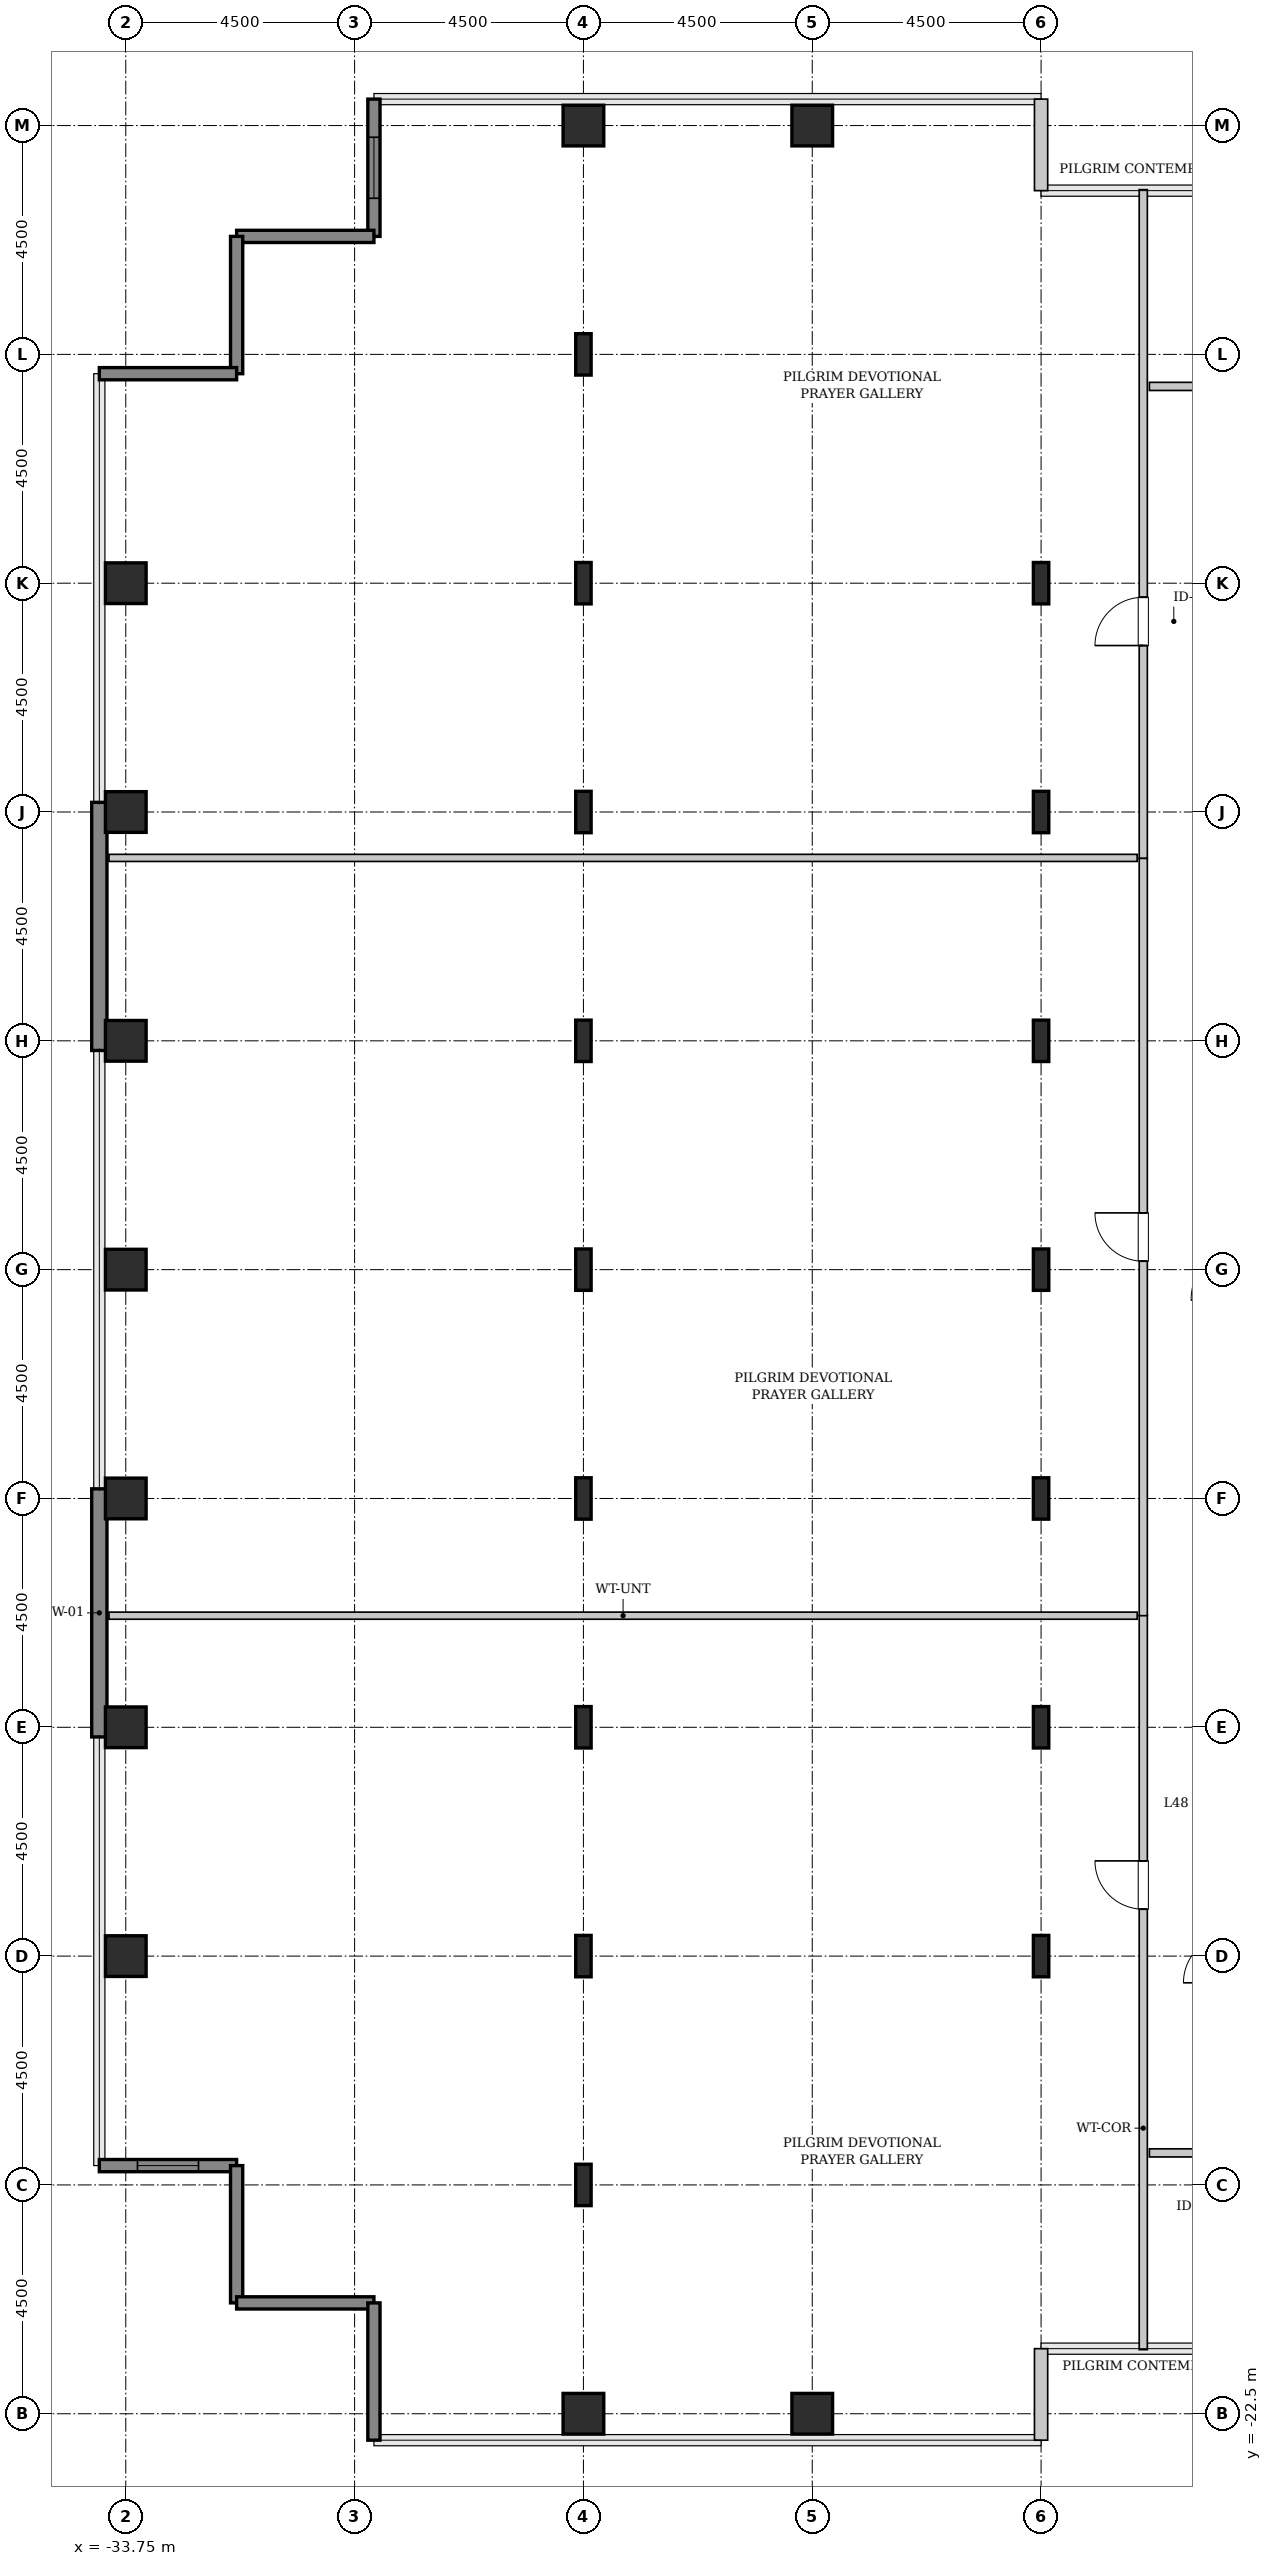
"""IFC4 building model, lengths in metres.
Left out: names, types, materials, properties, quantities, classifications, styles, units other than length and angle.
Written with IfcOpenShell. Run it as: python <this file> out.ifc"""

import sys

from ifc_helpers import new_model, si_unit, direction, frame, frame_2d, origin, origin_2d, place, context, subcontext, project, spatial, rectangle, hollow_rectangle, i_section, extrude, source, transform, mapped, element, fill, save


model = new_model("IFC4")
c1 = context("Model", 3, precision=1e-05, world=origin(), true_north=direction((0.0, 1.0)))
c2 = subcontext(c1, "Body", "Model", "MODEL_VIEW")
j1 = project(units=[si_unit("LENGTHUNIT", "METRE"), si_unit("PLANEANGLEUNIT", "RADIAN")], contexts=[c1])
p1 = place(None, origin())
s1 = spatial("IfcSite", under=j1, at=p1, CompositionType="ELEMENT")
p2 = place(p1, origin())
s2 = spatial("IfcBuilding", under=s1, at=p2, CompositionType="ELEMENT")
p3 = place(p2, frame((0.0, 0.0, 194.4)))
s3 = spatial("IfcBuildingStorey", under=s2, at=p3, CompositionType="ELEMENT", Elevation=194.4)
m1 = source(origin(), c2, "Body", "SweptSolid", [
    extrude(hollow_rectangle(XDim=0.8, YDim=0.8, WallThickness=0.04, InnerFilletRadius=0.04, OuterFilletRadius=0.08, at=origin_2d()), origin(), (0.0, 0.0, 1.0), 3.8),
])
for number, where, z_axis, x_axis in (
    (1, (-33.75, -13.5, 0.0), (0.0, 0.0, 1.0), (1.0, 0.0, 0.0)),
    (2, (-33.75, -9.0, 0.0), (0.0, 0.0, 1.0), (1.0, 0.0, 0.0)),
    (3, (-33.75, -4.5, 0.0), (0.0, 0.0, 1.0), (1.0, 0.0, 0.0)),
    (4, (-33.75, 0.0, 0.0), (0.0, 0.0, 1.0), (1.0, 0.0, 0.0)),
    (5, (-33.75, 4.5, 0.0), (0.0, 0.0, 1.0), (1.0, 0.0, 0.0)),
    (6, (-33.75, 9.0, 0.0), (0.0, 0.0, 1.0), (1.0, 0.0, 0.0)),
    (7, (-33.75, 13.5, 0.0), (0.0, 0.0, 1.0), (1.0, 0.0, 0.0)),
    (8, (-24.75, -22.5, 0.0), (0.0, 0.0, 1.0), (1.0, 0.0, 0.0)),
):
    element("IfcColumn", number, at=place(p3, frame(where, z_axis=z_axis, x_axis=x_axis)), inside=s3, PredefinedType="COLUMN", context=c2, shape_type="MappedRepresentation", body=[
        mapped(m1, transform((0.0, 0.0, 0.0), x_axis=(1.0, 0.0, 0.0), y_axis=(0.0, 1.0, 0.0), z_axis=(0.0, 0.0, 1.0), scale=1.0)),
    ])
m2 = source(origin(), c2, "Body", "SweptSolid", [
    extrude(i_section(OverallWidth=0.303, OverallDepth=0.814, WebThickness=0.021, FlangeThickness=0.04, FilletRadius=0.03, at=origin_2d()), origin(), (0.0, 0.0, 1.0), 3.8),
])
for number, where, z_axis, x_axis in (
    (9, (-24.75, -18.0, 0.0), (0.0, 0.0, 1.0), (1.0, 0.0, 0.0)),
    (10, (-24.75, -13.5, 0.0), (0.0, 0.0, 1.0), (1.0, 0.0, 0.0)),
    (11, (-24.75, -9.0, 0.0), (0.0, 0.0, 1.0), (1.0, 0.0, 0.0)),
    (12, (-24.75, -4.5, 0.0), (0.0, 0.0, 1.0), (1.0, 0.0, 0.0)),
    (13, (-24.75, 0.0, 0.0), (0.0, 0.0, 1.0), (1.0, 0.0, 0.0)),
    (14, (-24.75, 4.5, 0.0), (0.0, 0.0, 1.0), (1.0, 0.0, 0.0)),
    (15, (-24.75, 9.0, 0.0), (0.0, 0.0, 1.0), (1.0, 0.0, 0.0)),
    (16, (-24.75, 13.5, 0.0), (0.0, 0.0, 1.0), (1.0, 0.0, 0.0)),
    (17, (-24.75, 18.0, 0.0), (0.0, 0.0, 1.0), (1.0, 0.0, 0.0)),
):
    element("IfcColumn", number, at=place(p3, frame(where, z_axis=z_axis, x_axis=x_axis)), inside=s3, PredefinedType="COLUMN", context=c2, shape_type="MappedRepresentation", body=[
        mapped(m2, transform((0.0, 0.0, 0.0), x_axis=(1.0, 0.0, 0.0), y_axis=(0.0, 1.0, 0.0), z_axis=(0.0, 0.0, 1.0), scale=1.0)),
    ])
for number, where, z_axis, x_axis in (
    (18, (-24.75, 22.5, 0.0), (0.0, 0.0, 1.0), (1.0, 0.0, 0.0)),
    (19, (-20.25, -22.5, 0.0), (0.0, 0.0, 1.0), (1.0, 0.0, 0.0)),
    (20, (-20.25, 22.5, 0.0), (0.0, 0.0, 1.0), (1.0, 0.0, 0.0)),
):
    element("IfcColumn", number, at=place(p3, frame(where, z_axis=z_axis, x_axis=x_axis)), inside=s3, PredefinedType="COLUMN", context=c2, shape_type="MappedRepresentation", body=[
        mapped(m1, transform((0.0, 0.0, 0.0), x_axis=(1.0, 0.0, 0.0), y_axis=(0.0, 1.0, 0.0), z_axis=(0.0, 0.0, 1.0), scale=1.0)),
    ])
for number, where, z_axis, x_axis in (
    (21, (-15.75, -13.5, 0.0), (0.0, 0.0, 1.0), (1.0, 0.0, 0.0)),
    (22, (-15.75, -9.0, 0.0), (0.0, 0.0, 1.0), (1.0, 0.0, 0.0)),
    (23, (-15.75, -4.5, 0.0), (0.0, 0.0, 1.0), (1.0, 0.0, 0.0)),
    (24, (-15.75, 0.0, 0.0), (0.0, 0.0, 1.0), (1.0, 0.0, 0.0)),
    (25, (-15.75, 4.5, 0.0), (0.0, 0.0, 1.0), (1.0, 0.0, 0.0)),
    (26, (-15.75, 9.0, 0.0), (0.0, 0.0, 1.0), (1.0, 0.0, 0.0)),
    (27, (-15.75, 13.5, 0.0), (0.0, 0.0, 1.0), (1.0, 0.0, 0.0)),
):
    element("IfcColumn", number, at=place(p3, frame(where, z_axis=z_axis, x_axis=x_axis)), inside=s3, PredefinedType="COLUMN", context=c2, shape_type="MappedRepresentation", body=[
        mapped(m2, transform((0.0, 0.0, 0.0), x_axis=(1.0, 0.0, 0.0), y_axis=(0.0, 1.0, 0.0), z_axis=(0.0, 0.0, 1.0), scale=1.0)),
    ])
m3 = source(origin(), c2, "Body", "SweptSolid", [
    extrude(rectangle(XDim=4.88, YDim=0.3, at=frame_2d((2.44, 0.0))), origin(), (0.0, 0.0, 1.0), 3.55),
])
for number, where, z_axis, x_axis in (
    (28, (-34.27, -9.19, 0.0), (0.0, 0.0, 1.0), (0.0, 1.0, 0.0)),
    (29, (-34.27, 4.31, 0.0), (0.0, 0.0, 1.0), (0.0, 1.0, 0.0)),
):
    element("IfcWall", number, at=place(p3, frame(where, z_axis=z_axis, x_axis=x_axis)), inside=s3, PredefinedType="SHEAR", context=c2, shape_type="MappedRepresentation", body=[
        mapped(m3, transform((0.0, 0.0, 0.0), x_axis=(1.0, 0.0, 0.0), y_axis=(0.0, 1.0, 0.0), z_axis=(0.0, 0.0, 1.0), scale=1.0)),
    ])
m4 = source(origin(), c2, "Body", "SweptSolid", [
    extrude(rectangle(XDim=1.8, YDim=0.26, at=frame_2d((0.9, 0.0))), origin(), (0.0, 0.0, 1.0), 3.55),
])
p4 = place(p3, frame((-15.75, 21.22, 0.0), z_axis=(0.0, 0.0, 1.0), x_axis=(0.0, 1.0, 0.0)))
e30 = element("IfcWall", 30, at=p4, inside=s3, PredefinedType="SOLIDWALL", context=c2, shape_type="MappedRepresentation", body=[
    mapped(m4, transform((0.0, 0.0, 0.0), x_axis=(1.0, 0.0, 0.0), y_axis=(0.0, 1.0, 0.0), z_axis=(0.0, 0.0, 1.0), scale=1.0)),
])
m5 = source(origin(), c2, "Body", "SweptSolid", [
    extrude(rectangle(XDim=2.7, YDim=0.24, at=frame_2d((1.35, 0.0))), origin(), (0.0, 0.0, 1.0), 3.55),
])
p5 = place(p3, frame((-28.87, 23.02, 0.0), z_axis=(0.0, 0.0, 1.0), x_axis=(0.0, -1.0, 0.0)))
e31 = element("IfcWall", 31, at=p5, inside=s3, PredefinedType="SHEAR", context=c2, shape_type="MappedRepresentation", body=[
    mapped(m5, transform((0.0, 0.0, 0.0), x_axis=(1.0, 0.0, 0.0), y_axis=(0.0, 1.0, 0.0), z_axis=(0.0, 0.0, 1.0), scale=1.0)),
])
p6 = place(p5, frame((0.75, 0.0, 0.85)))
e32 = element("IfcOpeningElement", 32, at=p6, cuts=e31, PredefinedType="OPENING", context=c2, shape_type="SweptSolid", body=[
    extrude(rectangle(XDim=1.2, YDim=1.8, at=frame_2d((0.6, 0.9))), frame((0.0, 0.13, 0.0), z_axis=(0.0, -1.0, 0.0), x_axis=(1.0, 0.0, 0.0)), (0.0, 0.0, 1.0), 0.26),
])
for number, where, z_axis, x_axis in (
    (33, (-28.87, 20.32, 0.0), (0.0, 0.0, 1.0), (-1.0, 0.0, 0.0)),
    (34, (-31.57, 20.32, 0.0), (0.0, 0.0, 1.0), (0.0, -1.0, 0.0)),
    (35, (-31.57, 17.62, 0.0), (0.0, 0.0, 1.0), (-1.0, 0.0, 0.0)),
):
    element("IfcWall", number, at=place(p3, frame(where, z_axis=z_axis, x_axis=x_axis)), inside=s3, PredefinedType="SHEAR", context=c2, shape_type="MappedRepresentation", body=[
        mapped(m5, transform((0.0, 0.0, 0.0), x_axis=(1.0, 0.0, 0.0), y_axis=(0.0, 1.0, 0.0), z_axis=(0.0, 0.0, 1.0), scale=1.0)),
    ])
p7 = place(p3, frame((-34.27, -17.62, 0.0), z_axis=(0.0, 0.0, 1.0), x_axis=(1.0, 0.0, 0.0)))
e36 = element("IfcWall", 36, at=p7, inside=s3, PredefinedType="SHEAR", context=c2, shape_type="MappedRepresentation", body=[
    mapped(m5, transform((0.0, 0.0, 0.0), x_axis=(1.0, 0.0, 0.0), y_axis=(0.0, 1.0, 0.0), z_axis=(0.0, 0.0, 1.0), scale=1.0)),
])
p8 = place(p7, frame((0.75, 0.0, 0.85)))
e37 = element("IfcOpeningElement", 37, at=p8, cuts=e36, PredefinedType="OPENING", context=c2, shape_type="SweptSolid", body=[
    extrude(rectangle(XDim=1.2, YDim=1.8, at=frame_2d((0.6, 0.9))), frame((0.0, 0.13, 0.0), z_axis=(0.0, -1.0, 0.0), x_axis=(1.0, 0.0, 0.0)), (0.0, 0.0, 1.0), 0.26),
])
for number, where, z_axis, x_axis in (
    (38, (-31.57, -17.62, 0.0), (0.0, 0.0, 1.0), (0.0, -1.0, 0.0)),
    (39, (-31.57, -20.32, 0.0), (0.0, 0.0, 1.0), (1.0, 0.0, 0.0)),
    (40, (-28.87, -20.32, 0.0), (0.0, 0.0, 1.0), (0.0, -1.0, 0.0)),
):
    element("IfcWall", number, at=place(p3, frame(where, z_axis=z_axis, x_axis=x_axis)), inside=s3, PredefinedType="SHEAR", context=c2, shape_type="MappedRepresentation", body=[
        mapped(m5, transform((0.0, 0.0, 0.0), x_axis=(1.0, 0.0, 0.0), y_axis=(0.0, 1.0, 0.0), z_axis=(0.0, 0.0, 1.0), scale=1.0)),
    ])
p9 = place(p3, frame((-15.75, -23.02, 0.0), z_axis=(0.0, 0.0, 1.0), x_axis=(0.0, 1.0, 0.0)))
e41 = element("IfcWall", 41, at=p9, inside=s3, PredefinedType="SOLIDWALL", context=c2, shape_type="MappedRepresentation", body=[
    mapped(m4, transform((0.0, 0.0, 0.0), x_axis=(1.0, 0.0, 0.0), y_axis=(0.0, 1.0, 0.0), z_axis=(0.0, 0.0, 1.0), scale=1.0)),
])
m6 = source(origin(), c2, "Body", "SweptSolid", [
    extrude(rectangle(XDim=14.445, YDim=0.16, at=frame_2d((7.223, 0.0))), origin(), (0.0, 0.0, 1.0), 3.535),
])
p10 = place(p3, frame((-13.74, -21.24, 0.0), z_axis=(0.0, 0.0, 1.0), x_axis=(0.0, 1.0, 0.0)))
e42 = element("IfcWall", 42, at=p10, inside=s3, PredefinedType="PARTITIONING", context=c2, shape_type="MappedRepresentation", body=[
    mapped(m6, transform((0.0, 0.0, 0.0), x_axis=(1.0, 0.0, 0.0), y_axis=(0.0, 1.0, 0.0), z_axis=(0.0, 0.0, 1.0), scale=1.0)),
])
p11 = place(p10, frame((8.663, 0.0, 0.0)))
e43 = element("IfcOpeningElement", 43, at=p11, cuts=e42, PredefinedType="OPENING", context=c2, shape_type="SweptSolid", body=[
    extrude(rectangle(XDim=0.95, YDim=2.1, at=frame_2d((0.475, 1.05))), frame((0.0, 0.09, 0.0), z_axis=(0.0, -1.0, 0.0), x_axis=(1.0, 0.0, 0.0)), (0.0, 0.0, 1.0), 0.18),
])
m7 = source(origin(), c2, "Body", "SweptSolid", [
    extrude(rectangle(XDim=20.22, YDim=0.14, at=frame_2d((10.11, 0.0))), origin(), (0.0, 0.0, 1.0), 3.535),
])
p12 = place(p3, frame((-34.08, -6.805, 0.0), z_axis=(0.0, 0.0, 1.0), x_axis=(1.0, 0.0, 0.0)))
e44 = element("IfcWall", 44, at=p12, inside=s3, PredefinedType="PARTITIONING", context=c2, shape_type="MappedRepresentation", body=[
    mapped(m7, transform((0.0, 0.0, 0.0), x_axis=(1.0, 0.0, 0.0), y_axis=(0.0, 1.0, 0.0), z_axis=(0.0, 0.0, 1.0), scale=1.0)),
])
m8 = source(origin(), c2, "Body", "SweptSolid", [
    extrude(rectangle(XDim=13.153, YDim=0.16, at=frame_2d((6.576, 0.0))), origin(), (0.0, 0.0, 1.0), 3.535),
])
p13 = place(p3, frame((-13.74, 8.087, 0.0), z_axis=(0.0, 0.0, 1.0), x_axis=(0.0, 1.0, 0.0)))
e45 = element("IfcWall", 45, at=p13, inside=s3, PredefinedType="PARTITIONING", context=c2, shape_type="MappedRepresentation", body=[
    mapped(m8, transform((0.0, 0.0, 0.0), x_axis=(1.0, 0.0, 0.0), y_axis=(0.0, 1.0, 0.0), z_axis=(0.0, 0.0, 1.0), scale=1.0)),
])
p14 = place(p13, frame((4.186, 0.0, 0.0)))
e46 = element("IfcOpeningElement", 46, at=p14, cuts=e45, PredefinedType="OPENING", context=c2, shape_type="SweptSolid", body=[
    extrude(rectangle(XDim=0.95, YDim=2.1, at=frame_2d((0.475, 1.05))), frame((0.0, 0.09, 0.0), z_axis=(0.0, -1.0, 0.0), x_axis=(1.0, 0.0, 0.0)), (0.0, 0.0, 1.0), 0.18),
])
p15 = place(p3, frame((-34.08, 8.097, 0.0), z_axis=(0.0, 0.0, 1.0), x_axis=(1.0, 0.0, 0.0)))
e47 = element("IfcWall", 47, at=p15, inside=s3, PredefinedType="PARTITIONING", context=c2, shape_type="MappedRepresentation", body=[
    mapped(m7, transform((0.0, 0.0, 0.0), x_axis=(1.0, 0.0, 0.0), y_axis=(0.0, 1.0, 0.0), z_axis=(0.0, 0.0, 1.0), scale=1.0)),
])
m9 = source(origin(), c2, "Body", "SweptSolid", [
    extrude(rectangle(XDim=14.892, YDim=0.16, at=frame_2d((7.446, 0.0))), origin(), (0.0, 0.0, 1.0), 3.535),
])
p16 = place(p3, frame((-13.74, -6.805, 0.0), z_axis=(0.0, 0.0, 1.0), x_axis=(0.0, 1.0, 0.0)))
e48 = element("IfcWall", 48, at=p16, inside=s3, PredefinedType="PARTITIONING", context=c2, shape_type="MappedRepresentation", body=[
    mapped(m9, transform((0.0, 0.0, 0.0), x_axis=(1.0, 0.0, 0.0), y_axis=(0.0, 1.0, 0.0), z_axis=(0.0, 0.0, 1.0), scale=1.0)),
])
p17 = place(p16, frame((6.971, 0.0, 0.0)))
e49 = element("IfcOpeningElement", 49, at=p17, cuts=e48, PredefinedType="OPENING", context=c2, shape_type="SweptSolid", body=[
    extrude(rectangle(XDim=0.95, YDim=2.1, at=frame_2d((0.475, 1.05))), frame((0.0, 0.09, 0.0), z_axis=(0.0, -1.0, 0.0), x_axis=(1.0, 0.0, 0.0)), (0.0, 0.0, 1.0), 0.18),
])
m10 = source(origin(), c2, "Body", "SweptSolid", [
    extrude(rectangle(XDim=4.16, YDim=0.16, at=frame_2d((2.08, 0.0))), origin(), (0.0, 0.0, 1.0), 3.535),
])
p18 = place(p3, frame((-13.62, 17.37, 0.0), z_axis=(0.0, 0.0, 1.0), x_axis=(1.0, 0.0, 0.0)))
e50 = element("IfcWall", 50, at=p18, inside=s3, PredefinedType="PARTITIONING", context=c2, shape_type="MappedRepresentation", body=[
    mapped(m10, transform((0.0, 0.0, 0.0), x_axis=(1.0, 0.0, 0.0), y_axis=(0.0, 1.0, 0.0), z_axis=(0.0, 0.0, 1.0), scale=1.0)),
])
p19 = place(p18, frame((0.969, 0.0, 0.0)))
e51 = element("IfcOpeningElement", 51, at=p19, cuts=e50, PredefinedType="OPENING", context=c2, shape_type="SweptSolid", body=[
    extrude(rectangle(XDim=0.95, YDim=2.1, at=frame_2d((0.475, 1.05))), frame((0.0, 0.09, 0.0), z_axis=(0.0, -1.0, 0.0), x_axis=(1.0, 0.0, 0.0)), (0.0, 0.0, 1.0), 0.18),
])
m11 = source(origin(), c2, "Body", "SweptSolid", [
    extrude(rectangle(XDim=3.625, YDim=0.16, at=frame_2d((1.812, 0.0))), origin(), (0.0, 0.0, 1.0), 3.535),
])
p20 = place(p3, frame((-13.62, -17.37, 0.0), z_axis=(0.0, 0.0, 1.0), x_axis=(1.0, 0.0, 0.0)))
e52 = element("IfcWall", 52, at=p20, inside=s3, PredefinedType="PARTITIONING", context=c2, shape_type="MappedRepresentation", body=[
    mapped(m11, transform((0.0, 0.0, 0.0), x_axis=(1.0, 0.0, 0.0), y_axis=(0.0, 1.0, 0.0), z_axis=(0.0, 0.0, 1.0), scale=1.0)),
])
p21 = place(p20, frame((0.999, 0.0, 0.0)))
e53 = element("IfcOpeningElement", 53, at=p21, cuts=e52, PredefinedType="OPENING", context=c2, shape_type="SweptSolid", body=[
    extrude(rectangle(XDim=0.95, YDim=2.1, at=frame_2d((0.475, 1.05))), frame((0.0, 0.09, 0.0), z_axis=(0.0, -1.0, 0.0), x_axis=(1.0, 0.0, 0.0)), (0.0, 0.0, 1.0), 0.18),
])
m12 = source(origin(), c2, "Body", "SweptSolid", [
    extrude(rectangle(XDim=1.2, YDim=1.8, at=frame_2d((0.6, 0.9))), frame((0.0, 0.03, 0.0), z_axis=(0.0, -1.0, 0.0), x_axis=(1.0, 0.0, 0.0)), (0.0, 0.0, 1.0), 0.06),
])
p22 = place(p6, origin())
e54 = element("IfcWindow", 54, at=p22, inside=s3, PartitioningType="SINGLE_PANEL", PredefinedType="WINDOW", context=c2, shape_type="MappedRepresentation", body=[
    mapped(m12, transform((0.0, 0.0, 0.0), x_axis=(1.0, 0.0, 0.0), y_axis=(0.0, 1.0, 0.0), z_axis=(0.0, 0.0, 1.0), scale=1.0)),
])
fill(e32, e54)
p23 = place(p8, origin())
e55 = element("IfcWindow", 55, at=p23, inside=s3, PartitioningType="SINGLE_PANEL", PredefinedType="WINDOW", context=c2, shape_type="MappedRepresentation", body=[
    mapped(m12, transform((0.0, 0.0, 0.0), x_axis=(1.0, 0.0, 0.0), y_axis=(0.0, 1.0, 0.0), z_axis=(0.0, 0.0, 1.0), scale=1.0)),
])
fill(e37, e55)
m13 = source(origin(), c2, "Body", "SweptSolid", [
    extrude(rectangle(XDim=0.95, YDim=2.1, at=frame_2d((0.475, 1.05))), frame((0.0, 0.025, 0.0), z_axis=(0.0, -1.0, 0.0), x_axis=(1.0, 0.0, 0.0)), (0.0, 0.0, 1.0), 0.05),
])
p24 = place(p11, origin())
e56 = element("IfcDoor", 56, at=p24, inside=s3, OperationType="SINGLE_SWING_RIGHT", PredefinedType="DOOR", context=c2, shape_type="MappedRepresentation", body=[
    mapped(m13, transform((0.0, 0.0, 0.0), x_axis=(1.0, 0.0, 0.0), y_axis=(0.0, 1.0, 0.0), z_axis=(0.0, 0.0, 1.0), scale=1.0)),
])
fill(e43, e56)
p25 = place(p14, origin())
e57 = element("IfcDoor", 57, at=p25, inside=s3, OperationType="SINGLE_SWING_LEFT", PredefinedType="DOOR", context=c2, shape_type="MappedRepresentation", body=[
    mapped(m13, transform((0.0, 0.0, 0.0), x_axis=(1.0, 0.0, 0.0), y_axis=(0.0, 1.0, 0.0), z_axis=(0.0, 0.0, 1.0), scale=1.0)),
])
fill(e46, e57)
p26 = place(p17, origin())
e58 = element("IfcDoor", 58, at=p26, inside=s3, OperationType="SINGLE_SWING_RIGHT", PredefinedType="DOOR", context=c2, shape_type="MappedRepresentation", body=[
    mapped(m13, transform((0.0, 0.0, 0.0), x_axis=(1.0, 0.0, 0.0), y_axis=(0.0, 1.0, 0.0), z_axis=(0.0, 0.0, 1.0), scale=1.0)),
])
fill(e49, e58)
save(model, sys.argv[1])
